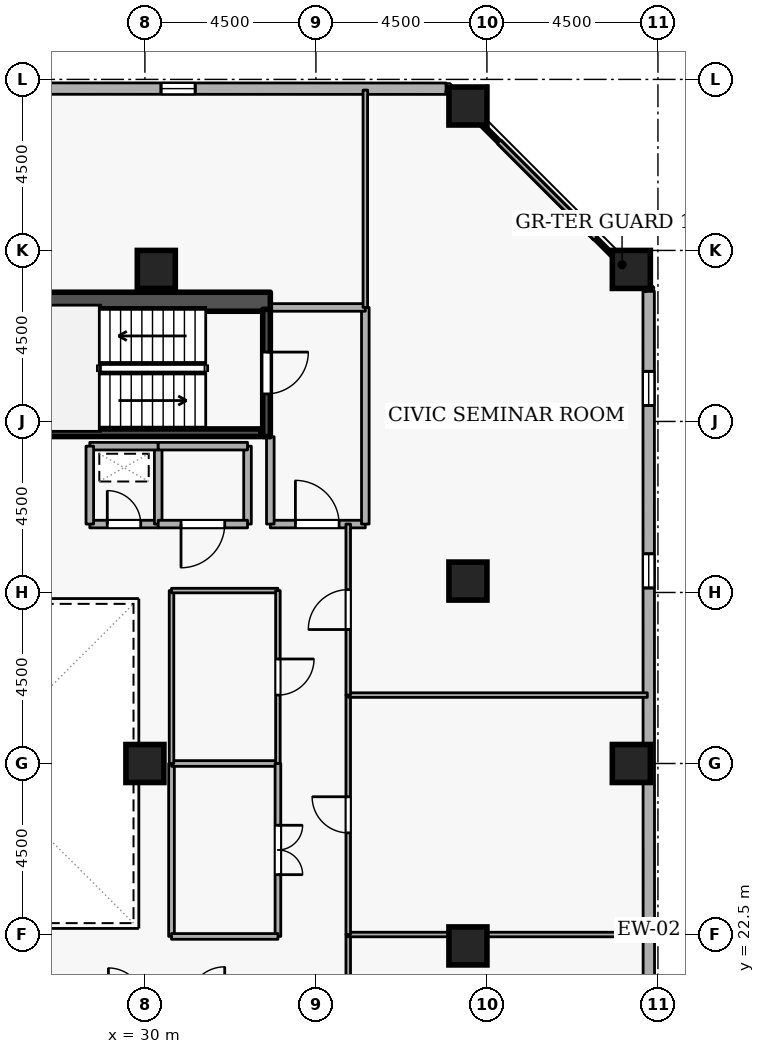
"""IFC4 building model, lengths in metres.
Left out: names, types, materials, properties, quantities, classifications, styles, units other than length and angle.
Written with IfcOpenShell. Run it as: python <this file> out.ifc"""

import sys

from ifc_helpers import new_model, si_unit, direction, frame, frame_2d, origin, origin_2d, place, context, subcontext, project, spatial, rectangle, extrude, element, fill, save


model = new_model("IFC4")
c1 = context("Model", 3, precision=1e-05, world=origin(), true_north=direction((0.0, 1.0)))
c2 = subcontext(c1, "Body", "Model", "MODEL_VIEW")
j1 = project(units=[si_unit("LENGTHUNIT", "METRE"), si_unit("PLANEANGLEUNIT", "RADIAN")], contexts=[c1])
p1 = place(None, origin())
s1 = spatial("IfcSite", under=j1, at=p1, CompositionType="ELEMENT")
p2 = place(p1, origin())
s2 = spatial("IfcBuilding", under=s1, at=p2, CompositionType="ELEMENT")
p3 = place(p2, frame((0.0, 0.0, 240.3)))
s3 = spatial("IfcBuildingStorey", under=s2, at=p3, CompositionType="ELEMENT", Elevation=240.3)
p4 = place(p3, frame((17.7, 39.15, 0.0), z_axis=(0.0, 0.0, 1.0), x_axis=(1.0, 0.0, 0.0)))
e1 = element("IfcWall", 1, at=p4, inside=s3, PredefinedType="SHEAR", context=c2, shape_type="SweptSolid", body=[
    extrude(rectangle(XDim=15.6, YDim=0.5, at=frame_2d((7.8, 0.0))), origin(), (0.0, 0.0, 1.0), 3.6),
])
for number, where, z_axis, x_axis in (
    (2, (42.8, 27.0, 0.0), (0.0, 0.0, 1.0), (1.0, 0.0, 0.0)),
    (3, (42.8, 40.0, 0.0), (0.0, 0.0, 1.0), (1.0, 0.0, 0.0)),
    (4, (38.5, 44.3, 0.0), (0.0, 0.0, 1.0), (1.0, 0.0, 0.0)),
    (5, (38.5, 22.2, 0.0), (0.0, 0.0, 1.0), (1.0, 0.0, 0.0)),
    (6, (38.5, 31.8, 0.0), (0.0, 0.0, 1.0), (1.0, 0.0, 0.0)),
    (7, (30.3, 40.0, 0.0), (0.0, 0.0, 1.0), (1.0, 0.0, 0.0)),
    (8, (30.0, 27.0, 0.0), (0.0, 0.0, 1.0), (1.0, 0.0, 0.0)),
):
    element("IfcColumn", number, at=place(p3, frame(where, z_axis=z_axis, x_axis=x_axis)), inside=s3, PredefinedType="COLUMN", context=c2, shape_type="SweptSolid", body=[
        extrude(rectangle(XDim=1.0, YDim=1.0, at=origin_2d()), origin(), (0.0, 0.0, 1.0), 3.6),
    ])
p5 = place(p3, frame((43.265, 5.819, 0.0), z_axis=(0.0, 0.0, 1.0), x_axis=(-0.000268805477, 0.999999963872, 0.0)))
e9 = element("IfcWall", 9, at=p5, inside=s3, PredefinedType="STANDARD", context=c2, shape_type="SweptSolid", body=[
    extrude(rectangle(XDim=33.605, YDim=0.3, at=frame_2d((16.802, 0.0))), origin(), (0.0, 0.0, 1.0), 2.7),
])
p6 = place(p5, frame((1.8, 0.0, 0.72)))
e10 = element("IfcOpeningElement", 10, at=p6, cuts=e9, PredefinedType="OPENING", context=c2, shape_type="SweptSolid", body=[
    extrude(rectangle(XDim=0.9, YDim=1.75, at=frame_2d((0.45, 0.875))), frame((0.0, 0.16, 0.0), z_axis=(0.0, -1.0, 0.0), x_axis=(1.0, 0.0, 0.0)), (0.0, 0.0, 1.0), 0.32),
])
p7 = place(p5, frame((11.4, 0.0, 0.72)))
e11 = element("IfcOpeningElement", 11, at=p7, cuts=e9, PredefinedType="OPENING", context=c2, shape_type="SweptSolid", body=[
    extrude(rectangle(XDim=0.9, YDim=1.75, at=frame_2d((0.45, 0.875))), frame((0.0, 0.16, 0.0), z_axis=(0.0, -1.0, 0.0), x_axis=(1.0, 0.0, 0.0)), (0.0, 0.0, 1.0), 0.32),
])
p8 = place(p5, frame((25.8, 0.0, 0.72)))
e12 = element("IfcOpeningElement", 12, at=p8, cuts=e9, PredefinedType="OPENING", context=c2, shape_type="SweptSolid", body=[
    extrude(rectangle(XDim=0.9, YDim=1.75, at=frame_2d((0.45, 0.875))), frame((0.0, 0.16, 0.0), z_axis=(0.0, -1.0, 0.0), x_axis=(1.0, 0.0, 0.0)), (0.0, 0.0, 1.0), 0.32),
])
p9 = place(p5, frame((30.6, 0.0, 0.72)))
e13 = element("IfcOpeningElement", 13, at=p9, cuts=e9, PredefinedType="OPENING", context=c2, shape_type="SweptSolid", body=[
    extrude(rectangle(XDim=0.9, YDim=1.75, at=frame_2d((0.45, 0.875))), frame((0.0, 0.16, 0.0), z_axis=(0.0, -1.0, 0.0), x_axis=(1.0, 0.0, 0.0)), (0.0, 0.0, 1.0), 0.32),
])
p10 = place(p3, frame((37.924, 44.756, 0.0), z_axis=(0.0, 0.0, 1.0), x_axis=(-0.999999963872, 0.000268805477, 0.0)))
e14 = element("IfcWall", 14, at=p10, inside=s3, PredefinedType="STANDARD", context=c2, shape_type="SweptSolid", body=[
    extrude(rectangle(XDim=33.605, YDim=0.3, at=frame_2d((16.802, 0.0))), origin(), (0.0, 0.0, 1.0), 2.7),
])
p11 = place(p10, frame((6.6, 0.0, 0.72)))
e15 = element("IfcOpeningElement", 15, at=p11, cuts=e14, PredefinedType="OPENING", context=c2, shape_type="SweptSolid", body=[
    extrude(rectangle(XDim=0.9, YDim=1.75, at=frame_2d((0.45, 0.875))), frame((0.0, 0.16, 0.0), z_axis=(0.0, -1.0, 0.0), x_axis=(1.0, 0.0, 0.0)), (0.0, 0.0, 1.0), 0.32),
])
p12 = place(p10, frame((16.2, 0.0, 0.72)))
e16 = element("IfcOpeningElement", 16, at=p12, cuts=e14, PredefinedType="OPENING", context=c2, shape_type="SweptSolid", body=[
    extrude(rectangle(XDim=0.9, YDim=1.75, at=frame_2d((0.45, 0.875))), frame((0.0, 0.16, 0.0), z_axis=(0.0, -1.0, 0.0), x_axis=(1.0, 0.0, 0.0)), (0.0, 0.0, 1.0), 0.32),
])
p13 = place(p10, frame((21.0, 0.0, 0.72)))
e17 = element("IfcOpeningElement", 17, at=p13, cuts=e14, PredefinedType="OPENING", context=c2, shape_type="SweptSolid", body=[
    extrude(rectangle(XDim=0.9, YDim=1.75, at=frame_2d((0.45, 0.875))), frame((0.0, 0.16, 0.0), z_axis=(0.0, -1.0, 0.0), x_axis=(1.0, 0.0, 0.0)), (0.0, 0.0, 1.0), 0.32),
])
p14 = place(p10, frame((30.6, 0.0, 0.72)))
e18 = element("IfcOpeningElement", 18, at=p14, cuts=e14, PredefinedType="OPENING", context=c2, shape_type="SweptSolid", body=[
    extrude(rectangle(XDim=0.9, YDim=1.75, at=frame_2d((0.45, 0.875))), frame((0.0, 0.16, 0.0), z_axis=(0.0, -1.0, 0.0), x_axis=(1.0, 0.0, 0.0)), (0.0, 0.0, 1.0), 0.32),
])
p15 = place(p3, frame((33.2, 38.95, 0.0), z_axis=(0.0, 0.0, 1.0), x_axis=(0.0, -1.0, 0.0)))
e19 = element("IfcWall", 19, at=p15, inside=s3, PredefinedType="SHEAR", context=c2, shape_type="SweptSolid", body=[
    extrude(rectangle(XDim=3.35, YDim=0.2, at=frame_2d((1.675, 0.0))), origin(), (0.0, 0.0, 1.0), 3.6),
])
p16 = place(p15, frame((1.125, 0.0, 0.0)))
e20 = element("IfcOpeningElement", 20, at=p16, cuts=e19, PredefinedType="OPENING", context=c2, shape_type="SweptSolid", body=[
    extrude(rectangle(XDim=1.1, YDim=2.1, at=frame_2d((0.55, 1.05))), frame((0.0, 0.11, 0.0), z_axis=(0.0, -1.0, 0.0), x_axis=(1.0, 0.0, 0.0)), (0.0, 0.0, 1.0), 0.22),
])
p17 = place(p3, frame((25.95, 35.703, 0.0), z_axis=(0.0, 0.0, 1.0), x_axis=(1.0, 0.0, 0.0)))
e21 = element("IfcWall", 21, at=p17, inside=s3, PredefinedType="SHEAR", context=c2, shape_type="SweptSolid", body=[
    extrude(rectangle(XDim=7.1, YDim=0.2, at=frame_2d((3.55, 0.0))), origin(), (0.0, 0.0, 1.0), 3.6),
])
p18 = place(p3, frame((33.3, 33.3, 0.0), z_axis=(0.0, 0.0, 1.0), x_axis=(1.0, 0.0, 0.0)))
e22 = element("IfcWall", 22, at=p18, inside=s3, PredefinedType="STANDARD", context=c2, shape_type="SweptSolid", body=[
    extrude(rectangle(XDim=2.5, YDim=0.2, at=frame_2d((1.25, 0.0))), origin(), (0.0, 0.0, 1.0), 3.34),
])
p19 = place(p18, frame((0.66, 0.0, 0.0)))
e23 = element("IfcOpeningElement", 23, at=p19, cuts=e22, PredefinedType="OPENING", context=c2, shape_type="SweptSolid", body=[
    extrude(rectangle(XDim=1.15, YDim=2.1, at=frame_2d((0.575, 1.05))), frame((0.0, 0.11, 0.0), z_axis=(0.0, -1.0, 0.0), x_axis=(1.0, 0.0, 0.0)), (0.0, 0.0, 1.0), 0.22),
])
p20 = place(p3, frame((35.8, 33.3, 0.0), z_axis=(0.0, 0.0, 1.0), x_axis=(0.0, 1.0, 0.0)))
e24 = element("IfcWall", 24, at=p20, inside=s3, PredefinedType="STANDARD", context=c2, shape_type="SweptSolid", body=[
    extrude(rectangle(XDim=5.7, YDim=0.2, at=frame_2d((2.85, 0.0))), origin(), (0.0, 0.0, 1.0), 3.34),
])
p21 = place(p3, frame((35.8, 39.0, 0.0), z_axis=(0.0, 0.0, 1.0), x_axis=(-1.0, 0.0, 0.0)))
e25 = element("IfcWall", 25, at=p21, inside=s3, PredefinedType="STANDARD", context=c2, shape_type="SweptSolid", body=[
    extrude(rectangle(XDim=2.5, YDim=0.2, at=frame_2d((1.25, 0.0))), origin(), (0.0, 0.0, 1.0), 3.34),
])
p22 = place(p3, frame((33.3, 35.6, 0.0), z_axis=(0.0, 0.0, 1.0), x_axis=(0.0, -1.0, 0.0)))
e26 = element("IfcWall", 26, at=p22, inside=s3, PredefinedType="STANDARD", context=c2, shape_type="SweptSolid", body=[
    extrude(rectangle(XDim=2.3, YDim=0.2, at=frame_2d((1.15, 0.0))), origin(), (0.0, 0.0, 1.0), 2.545),
])
p23 = place(p3, frame((28.55, 33.3, 0.0), z_axis=(0.0, 0.0, 1.0), x_axis=(1.0, 0.0, 0.0)))
e27 = element("IfcWall", 27, at=p23, inside=s3, PredefinedType="STANDARD", context=c2, shape_type="SweptSolid", body=[
    extrude(rectangle(XDim=1.8, YDim=0.2, at=frame_2d((0.9, 0.0))), origin(), (0.0, 0.0, 1.0), 3.34),
])
p24 = place(p23, frame((0.46, 0.0, 0.0)))
e28 = element("IfcOpeningElement", 28, at=p24, cuts=e27, PredefinedType="OPENING", context=c2, shape_type="SweptSolid", body=[
    extrude(rectangle(XDim=0.88, YDim=2.04, at=frame_2d((0.44, 1.02))), frame((0.0, 0.11, 0.0), z_axis=(0.0, -1.0, 0.0), x_axis=(1.0, 0.0, 0.0)), (0.0, 0.0, 1.0), 0.22),
])
p25 = place(p3, frame((30.35, 33.3, 0.0), z_axis=(0.0, 0.0, 1.0), x_axis=(0.0, 1.0, 0.0)))
e29 = element("IfcWall", 29, at=p25, inside=s3, PredefinedType="STANDARD", context=c2, shape_type="SweptSolid", body=[
    extrude(rectangle(XDim=2.05, YDim=0.2, at=frame_2d((1.025, 0.0))), origin(), (0.0, 0.0, 1.0), 3.34),
])
p26 = place(p3, frame((30.35, 35.35, 0.0), z_axis=(0.0, 0.0, 1.0), x_axis=(-1.0, 0.0, 0.0)))
e30 = element("IfcWall", 30, at=p26, inside=s3, PredefinedType="STANDARD", context=c2, shape_type="SweptSolid", body=[
    extrude(rectangle(XDim=1.8, YDim=0.2, at=frame_2d((0.9, 0.0))), origin(), (0.0, 0.0, 1.0), 3.34),
])
p27 = place(p3, frame((28.55, 35.35, 0.0), z_axis=(0.0, 0.0, 1.0), x_axis=(0.0, -1.0, 0.0)))
e31 = element("IfcWall", 31, at=p27, inside=s3, PredefinedType="STANDARD", context=c2, shape_type="SweptSolid", body=[
    extrude(rectangle(XDim=2.05, YDim=0.2, at=frame_2d((1.025, 0.0))), origin(), (0.0, 0.0, 1.0), 3.34),
])
p28 = place(p3, frame((32.7, 35.35, 0.0), z_axis=(0.0, 0.0, 1.0), x_axis=(0.0, -1.0, 0.0)))
e32 = element("IfcWall", 32, at=p28, inside=s3, PredefinedType="STANDARD", context=c2, shape_type="SweptSolid", body=[
    extrude(rectangle(XDim=2.05, YDim=0.2, at=frame_2d((1.025, 0.0))), origin(), (0.0, 0.0, 1.0), 2.545),
])
p29 = place(p3, frame((32.7, 33.3, 0.0), z_axis=(0.0, 0.0, 1.0), x_axis=(-1.0, 0.0, 0.0)))
e33 = element("IfcWall", 33, at=p29, inside=s3, PredefinedType="STANDARD", context=c2, shape_type="SweptSolid", body=[
    extrude(rectangle(XDim=2.35, YDim=0.2, at=frame_2d((1.175, 0.0))), origin(), (0.0, 0.0, 1.0), 3.34),
])
p30 = place(p29, frame((0.6, 0.0, 0.0)))
e34 = element("IfcOpeningElement", 34, at=p30, cuts=e33, PredefinedType="OPENING", context=c2, shape_type="SweptSolid", body=[
    extrude(rectangle(XDim=1.15, YDim=2.1, at=frame_2d((0.575, 1.05))), frame((0.0, 0.11, 0.0), z_axis=(0.0, -1.0, 0.0), x_axis=(1.0, 0.0, 0.0)), (0.0, 0.0, 1.0), 0.22),
])
p31 = place(p3, frame((30.35, 35.35, 0.0), z_axis=(0.0, 0.0, 1.0), x_axis=(1.0, 0.0, 0.0)))
e35 = element("IfcWall", 35, at=p31, inside=s3, PredefinedType="STANDARD", context=c2, shape_type="SweptSolid", body=[
    extrude(rectangle(XDim=2.35, YDim=0.2, at=frame_2d((1.175, 0.0))), origin(), (0.0, 0.0, 1.0), 3.34),
])
p32 = place(p3, frame((35.35, 14.8, 0.0), z_axis=(0.0, 0.0, 1.0), x_axis=(0.0, 1.0, 0.0)))
e36 = element("IfcWall", 36, at=p32, inside=s3, PredefinedType="PARTITIONING", context=c2, shape_type="SweptSolid", body=[
    extrude(rectangle(XDim=7.7, YDim=0.12, at=frame_2d((3.85, 0.0))), origin(), (0.0, 0.0, 1.0), 3.34),
])
p33 = place(p32, frame((3.325, 0.0, 0.0)))
e37 = element("IfcOpeningElement", 37, at=p33, cuts=e36, PredefinedType="OPENING", context=c2, shape_type="SweptSolid", body=[
    extrude(rectangle(XDim=1.05, YDim=2.1, at=frame_2d((0.525, 1.05))), frame((0.0, 0.07, 0.0), z_axis=(0.0, -1.0, 0.0), x_axis=(1.0, 0.0, 0.0)), (0.0, 0.0, 1.0), 0.14),
])
p34 = place(p3, frame((35.35, 22.5, 0.0), z_axis=(0.0, 0.0, 1.0), x_axis=(1.0, 0.0, 0.0)))
e38 = element("IfcWall", 38, at=p34, inside=s3, PredefinedType="PARTITIONING", context=c2, shape_type="SweptSolid", body=[
    extrude(rectangle(XDim=7.87, YDim=0.12, at=frame_2d((3.935, 0.0))), origin(), (0.0, 0.0, 1.0), 3.34),
])
p35 = place(p3, frame((35.35, 22.5, 0.0), z_axis=(0.0, 0.0, 1.0), x_axis=(0.0, 1.0, 0.0)))
e39 = element("IfcWall", 39, at=p35, inside=s3, PredefinedType="PARTITIONING", context=c2, shape_type="SweptSolid", body=[
    extrude(rectangle(XDim=6.3, YDim=0.12, at=frame_2d((3.15, 0.0))), origin(), (0.0, 0.0, 1.0), 3.34),
])
p36 = place(p35, frame((2.675, 0.0, 0.0)))
e40 = element("IfcOpeningElement", 40, at=p36, cuts=e39, PredefinedType="OPENING", context=c2, shape_type="SweptSolid", body=[
    extrude(rectangle(XDim=0.95, YDim=2.1, at=frame_2d((0.475, 1.05))), frame((0.0, 0.07, 0.0), z_axis=(0.0, -1.0, 0.0), x_axis=(1.0, 0.0, 0.0)), (0.0, 0.0, 1.0), 0.14),
])
p37 = place(p3, frame((35.35, 28.8, 0.0), z_axis=(0.0, 0.0, 1.0), x_axis=(1.0, 0.0, 0.0)))
e41 = element("IfcWall", 41, at=p37, inside=s3, PredefinedType="PARTITIONING", context=c2, shape_type="SweptSolid", body=[
    extrude(rectangle(XDim=7.87, YDim=0.12, at=frame_2d((3.935, 0.0))), origin(), (0.0, 0.0, 1.0), 3.34),
])
p38 = place(p3, frame((35.8, 39.0, 0.0), z_axis=(0.0, 0.0, 1.0), x_axis=(0.0, 1.0, 0.0)))
e42 = element("IfcWall", 42, at=p38, inside=s3, PredefinedType="PARTITIONING", context=c2, shape_type="SweptSolid", body=[
    extrude(rectangle(XDim=5.72, YDim=0.12, at=frame_2d((2.86, 0.0))), origin(), (0.0, 0.0, 1.0), 3.34),
])
p39 = place(p3, frame((37.956, 44.72, 0.0), z_axis=(0.0, 0.0, 1.0), x_axis=(0.707106781187, -0.707106781187, 0.0)))
e43 = element("IfcWall", 43, at=p39, inside=s3, PredefinedType="PARTITIONING", context=c2, shape_type="SweptSolid", body=[
    extrude(rectangle(XDim=7.444, YDim=0.12, at=frame_2d((3.722, 0.0))), origin(), (0.0, 0.0, 1.0), 3.34),
])
p40 = place(p3, frame((35.35, 28.8, 0.0), z_axis=(0.0, 0.0, 1.0), x_axis=(0.0, 1.0, 0.0)))
e44 = element("IfcWall", 44, at=p40, inside=s3, PredefinedType="PARTITIONING", context=c2, shape_type="SweptSolid", body=[
    extrude(rectangle(XDim=4.5, YDim=0.12, at=frame_2d((2.25, 0.0))), origin(), (0.0, 0.0, 1.0), 3.34),
])
p41 = place(p40, frame((1.725, 0.0, 0.0)))
e45 = element("IfcOpeningElement", 45, at=p41, cuts=e44, PredefinedType="OPENING", context=c2, shape_type="SweptSolid", body=[
    extrude(rectangle(XDim=1.05, YDim=2.1, at=frame_2d((0.525, 1.05))), frame((0.0, 0.07, 0.0), z_axis=(0.0, -1.0, 0.0), x_axis=(1.0, 0.0, 0.0)), (0.0, 0.0, 1.0), 0.14),
])
p42 = place(p3, frame((30.7, 22.45, 0.0), z_axis=(0.0, 0.0, 1.0), x_axis=(0.0, 1.0, 0.0)))
e46 = element("IfcWall", 46, at=p42, inside=s3, PredefinedType="PARTITIONING", context=c2, shape_type="SweptSolid", body=[
    extrude(rectangle(XDim=4.55, YDim=0.15, at=frame_2d((2.275, 0.0))), origin(), (0.0, 0.0, 1.0), 3.34),
])
p43 = place(p3, frame((30.7, 27.0, 0.0), z_axis=(0.0, 0.0, 1.0), x_axis=(1.0, 0.0, 0.0)))
e47 = element("IfcWall", 47, at=p43, inside=s3, PredefinedType="PARTITIONING", context=c2, shape_type="SweptSolid", body=[
    extrude(rectangle(XDim=2.8, YDim=0.15, at=frame_2d((1.4, 0.0))), origin(), (0.0, 0.0, 1.0), 2.878),
])
p44 = place(p3, frame((33.5, 27.0, 0.0), z_axis=(0.0, 0.0, 1.0), x_axis=(0.0, -1.0, 0.0)))
e48 = element("IfcWall", 48, at=p44, inside=s3, PredefinedType="PARTITIONING", context=c2, shape_type="SweptSolid", body=[
    extrude(rectangle(XDim=4.55, YDim=0.15, at=frame_2d((2.275, 0.0))), origin(), (0.0, 0.0, 1.0), 3.34),
])
p45 = place(p44, frame((1.625, 0.0, 0.0)))
e49 = element("IfcOpeningElement", 49, at=p45, cuts=e48, PredefinedType="OPENING", context=c2, shape_type="SweptSolid", body=[
    extrude(rectangle(XDim=1.3, YDim=2.12, at=frame_2d((0.65, 1.06))), frame((0.0, 0.085, 0.0), z_axis=(0.0, -1.0, 0.0), x_axis=(1.0, 0.0, 0.0)), (0.0, 0.0, 1.0), 0.17),
])
p46 = place(p3, frame((33.5, 22.45, 0.0), z_axis=(0.0, 0.0, 1.0), x_axis=(-1.0, 0.0, 0.0)))
e50 = element("IfcWall", 50, at=p46, inside=s3, PredefinedType="PARTITIONING", context=c2, shape_type="SweptSolid", body=[
    extrude(rectangle(XDim=2.8, YDim=0.15, at=frame_2d((1.4, 0.0))), origin(), (0.0, 0.0, 1.0), 3.34),
])
p47 = place(p3, frame((30.7, 27.0, 0.0), z_axis=(0.0, 0.0, 1.0), x_axis=(0.0, 1.0, 0.0)))
e51 = element("IfcWall", 51, at=p47, inside=s3, PredefinedType="PARTITIONING", context=c2, shape_type="SweptSolid", body=[
    extrude(rectangle(XDim=4.55, YDim=0.12, at=frame_2d((2.275, 0.0))), origin(), (0.0, 0.0, 1.0), 3.34),
])
p48 = place(p3, frame((30.7, 31.55, 0.0), z_axis=(0.0, 0.0, 1.0), x_axis=(1.0, 0.0, 0.0)))
e52 = element("IfcWall", 52, at=p48, inside=s3, PredefinedType="PARTITIONING", context=c2, shape_type="SweptSolid", body=[
    extrude(rectangle(XDim=2.8, YDim=0.12, at=frame_2d((1.4, 0.0))), origin(), (0.0, 0.0, 1.0), 3.34),
])
p49 = place(p3, frame((33.5, 31.55, 0.0), z_axis=(0.0, 0.0, 1.0), x_axis=(0.0, -1.0, 0.0)))
e53 = element("IfcWall", 53, at=p49, inside=s3, PredefinedType="PARTITIONING", context=c2, shape_type="SweptSolid", body=[
    extrude(rectangle(XDim=4.55, YDim=0.12, at=frame_2d((2.275, 0.0))), origin(), (0.0, 0.0, 1.0), 3.34),
])
p50 = place(p49, frame((1.8, 0.0, 0.0)))
e54 = element("IfcOpeningElement", 54, at=p50, cuts=e53, PredefinedType="OPENING", context=c2, shape_type="SweptSolid", body=[
    extrude(rectangle(XDim=0.95, YDim=2.1, at=frame_2d((0.475, 1.05))), frame((0.0, 0.07, 0.0), z_axis=(0.0, -1.0, 0.0), x_axis=(1.0, 0.0, 0.0)), (0.0, 0.0, 1.0), 0.14),
])
p51 = place(p8, origin())
e55 = element("IfcWindow", 55, at=p51, inside=s3, PartitioningType="SINGLE_PANEL", PredefinedType="WINDOW", context=c2, shape_type="SweptSolid", body=[
    extrude(rectangle(XDim=0.9, YDim=1.75, at=frame_2d((0.45, 0.875))), frame((0.0, 0.03, 0.0), z_axis=(0.0, -1.0, 0.0), x_axis=(1.0, 0.0, 0.0)), (0.0, 0.0, 1.0), 0.06),
])
fill(e12, e55)
p52 = place(p9, origin())
e56 = element("IfcWindow", 56, at=p52, inside=s3, PartitioningType="SINGLE_PANEL", PredefinedType="WINDOW", context=c2, shape_type="SweptSolid", body=[
    extrude(rectangle(XDim=0.9, YDim=1.75, at=frame_2d((0.45, 0.875))), frame((0.0, 0.03, 0.0), z_axis=(0.0, -1.0, 0.0), x_axis=(1.0, 0.0, 0.0)), (0.0, 0.0, 1.0), 0.06),
])
fill(e13, e56)
p53 = place(p11, origin())
e57 = element("IfcWindow", 57, at=p53, inside=s3, PartitioningType="SINGLE_PANEL", PredefinedType="WINDOW", context=c2, shape_type="SweptSolid", body=[
    extrude(rectangle(XDim=0.9, YDim=1.75, at=frame_2d((0.45, 0.875))), frame((0.0, 0.03, 0.0), z_axis=(0.0, -1.0, 0.0), x_axis=(1.0, 0.0, 0.0)), (0.0, 0.0, 1.0), 0.06),
])
fill(e15, e57)
p54 = place(p16, origin())
e58 = element("IfcDoor", 58, at=p54, inside=s3, OperationType="SINGLE_SWING_LEFT", PredefinedType="DOOR", context=c2, shape_type="SweptSolid", body=[
    extrude(rectangle(XDim=1.1, YDim=2.1, at=frame_2d((0.55, 1.05))), frame((0.0, 0.025, 0.0), z_axis=(0.0, -1.0, 0.0), x_axis=(1.0, 0.0, 0.0)), (0.0, 0.0, 1.0), 0.05),
])
fill(e20, e58)
p55 = place(p19, origin())
e59 = element("IfcDoor", 59, at=p55, inside=s3, OperationType="SINGLE_SWING_LEFT", PredefinedType="DOOR", context=c2, shape_type="SweptSolid", body=[
    extrude(rectangle(XDim=1.15, YDim=2.1, at=frame_2d((0.575, 1.05))), frame((0.0, 0.025, 0.0), z_axis=(0.0, -1.0, 0.0), x_axis=(1.0, 0.0, 0.0)), (0.0, 0.0, 1.0), 0.05),
])
fill(e23, e59)
p56 = place(p24, origin())
e60 = element("IfcDoor", 60, at=p56, inside=s3, OperationType="SINGLE_SWING_LEFT", PredefinedType="DOOR", context=c2, shape_type="SweptSolid", body=[
    extrude(rectangle(XDim=0.88, YDim=2.04, at=frame_2d((0.44, 1.02))), frame((0.0, 0.025, 0.0), z_axis=(0.0, -1.0, 0.0), x_axis=(1.0, 0.0, 0.0)), (0.0, 0.0, 1.0), 0.05),
])
fill(e28, e60)
p57 = place(p30, origin())
e61 = element("IfcDoor", 61, at=p57, inside=s3, OperationType="SINGLE_SWING_RIGHT", PredefinedType="DOOR", context=c2, shape_type="SweptSolid", body=[
    extrude(rectangle(XDim=1.15, YDim=2.1, at=frame_2d((0.575, 1.05))), frame((0.0, 0.025, 0.0), z_axis=(0.0, -1.0, 0.0), x_axis=(1.0, 0.0, 0.0)), (0.0, 0.0, 1.0), 0.05),
])
fill(e34, e61)
p58 = place(p36, origin())
e62 = element("IfcDoor", 62, at=p58, inside=s3, OperationType="SINGLE_SWING_RIGHT", PredefinedType="DOOR", context=c2, shape_type="SweptSolid", body=[
    extrude(rectangle(XDim=0.95, YDim=2.1, at=frame_2d((0.475, 1.05))), frame((0.0, 0.025, 0.0), z_axis=(0.0, -1.0, 0.0), x_axis=(1.0, 0.0, 0.0)), (0.0, 0.0, 1.0), 0.05),
])
fill(e40, e62)
p59 = place(p41, origin())
e63 = element("IfcDoor", 63, at=p59, inside=s3, OperationType="SINGLE_SWING_LEFT", PredefinedType="DOOR", context=c2, shape_type="SweptSolid", body=[
    extrude(rectangle(XDim=1.05, YDim=2.1, at=frame_2d((0.525, 1.05))), frame((0.0, 0.025, 0.0), z_axis=(0.0, -1.0, 0.0), x_axis=(1.0, 0.0, 0.0)), (0.0, 0.0, 1.0), 0.05),
])
fill(e45, e63)
p60 = place(p45, origin())
e64 = element("IfcDoor", 64, at=p60, inside=s3, OperationType="DOUBLE_DOOR_SINGLE_SWING", PredefinedType="DOOR", context=c2, shape_type="SweptSolid", body=[
    extrude(rectangle(XDim=1.3, YDim=2.12, at=frame_2d((0.65, 1.06))), frame((0.0, 0.025, 0.0), z_axis=(0.0, -1.0, 0.0), x_axis=(1.0, 0.0, 0.0)), (0.0, 0.0, 1.0), 0.05),
])
fill(e49, e64)
p61 = place(p50, origin())
e65 = element("IfcDoor", 65, at=p61, inside=s3, OperationType="SINGLE_SWING_LEFT", PredefinedType="DOOR", context=c2, shape_type="SweptSolid", body=[
    extrude(rectangle(XDim=0.95, YDim=2.1, at=frame_2d((0.475, 1.05))), frame((0.0, 0.025, 0.0), z_axis=(0.0, -1.0, 0.0), x_axis=(1.0, 0.0, 0.0)), (0.0, 0.0, 1.0), 0.05),
])
fill(e54, e65)
save(model, sys.argv[1])
